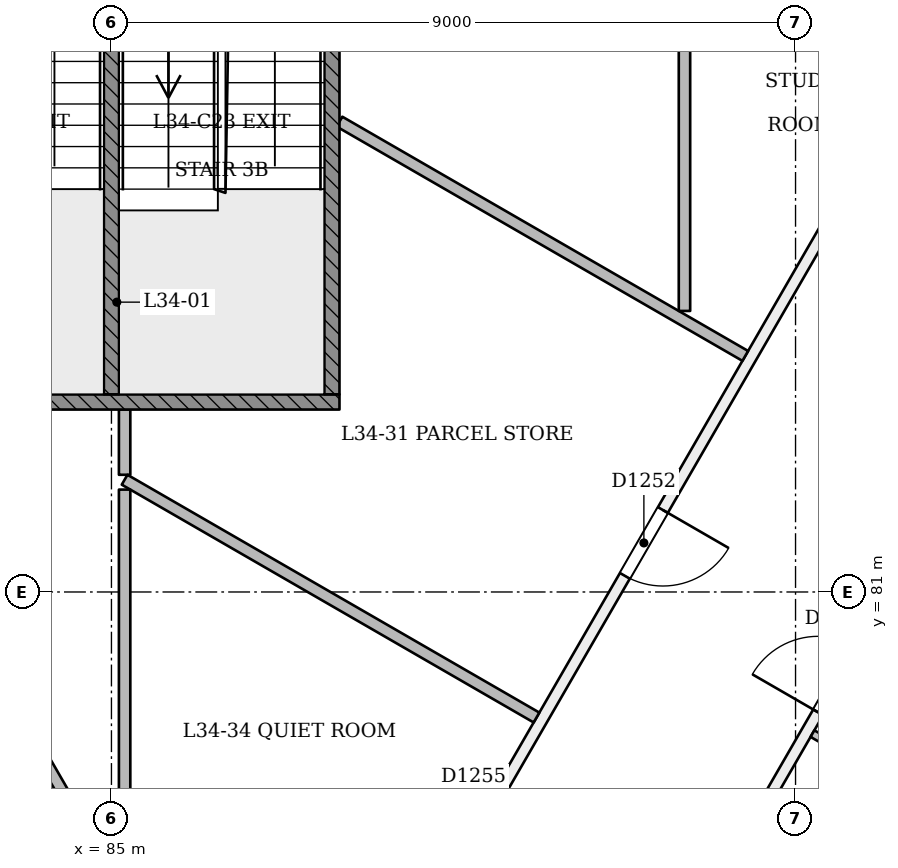
"""IFC4 building model, lengths in metres.
Left out: names, types, materials, properties, quantities, classifications, styles, units other than length and angle.
Written with IfcOpenShell. Run it as: python <this file> out.ifc"""

import sys

from ifc_helpers import new_model, si_unit, direction, frame, frame_2d, origin, place, context, subcontext, project, spatial, rectangle, extrude, element, fill, save


model = new_model("IFC4")
c1 = context("Model", 3, precision=1e-05, world=origin(), true_north=direction((0.0, 1.0)))
c2 = subcontext(c1, "Body", "Model", "MODEL_VIEW")
j1 = project(units=[si_unit("LENGTHUNIT", "METRE"), si_unit("PLANEANGLEUNIT", "RADIAN")], contexts=[c1])
p1 = place(None, origin())
s1 = spatial("IfcSite", under=j1, at=p1, CompositionType="ELEMENT")
p2 = place(p1, origin())
s2 = spatial("IfcBuilding", under=s1, at=p2, CompositionType="ELEMENT")
p3 = place(p2, frame((0.0, 0.0, 135.0)))
s3 = spatial("IfcBuildingStorey", under=s2, at=p3, CompositionType="ELEMENT", Elevation=135.0)
p4 = place(p3, frame((96.944, 90.2, 0.0), z_axis=(0.0, 0.0, 1.0), x_axis=(-0.500002955053, -0.866023697677, 0.0)))
e1 = element("IfcWall", 1, at=p4, inside=s3, PredefinedType="PARTITIONING", context=c2, shape_type="SweptSolid", body=[
    extrude(rectangle(XDim=23.758, YDim=0.15, at=frame_2d((11.879, 0.0))), origin(), (0.0, 0.0, 1.0), 3.15),
])
p5 = place(p4, frame((18.181, 0.0, 0.0)))
e2 = element("IfcOpeningElement", 2, at=p5, cuts=e1, PredefinedType="OPENING", context=c2, shape_type="SweptSolid", body=[
    extrude(rectangle(XDim=1.0, YDim=2.1, at=frame_2d((0.5, 1.05))), frame((0.0, 0.085, 0.0), z_axis=(0.0, -1.0, 0.0), x_axis=(1.0, 0.0, 0.0)), (0.0, 0.0, 1.0), 0.171),
])
p6 = place(p4, frame((9.378, 0.0, 0.0)))
e3 = element("IfcOpeningElement", 3, at=p6, cuts=e1, PredefinedType="OPENING", context=c2, shape_type="SweptSolid", body=[
    extrude(rectangle(XDim=1.0, YDim=2.1, at=frame_2d((0.5, 1.05))), frame((0.0, 0.085, 0.0), z_axis=(0.0, -1.0, 0.0), x_axis=(1.0, 0.0, 0.0)), (0.0, 0.0, 1.0), 0.171),
])
p7 = place(p4, frame((13.859, 0.0, 0.0)))
e4 = element("IfcOpeningElement", 4, at=p7, cuts=e1, PredefinedType="OPENING", context=c2, shape_type="SweptSolid", body=[
    extrude(rectangle(XDim=1.0, YDim=2.1, at=frame_2d((0.5, 1.05))), frame((0.0, 0.085, 0.0), z_axis=(0.0, -1.0, 0.0), x_axis=(1.0, 0.0, 0.0)), (0.0, 0.0, 1.0), 0.171),
])
p8 = place(p4, frame((2.845, 0.0, 0.0)))
e5 = element("IfcOpeningElement", 5, at=p8, cuts=e1, PredefinedType="OPENING", context=c2, shape_type="SweptSolid", body=[
    extrude(rectangle(XDim=1.0, YDim=2.1, at=frame_2d((0.5, 1.05))), frame((0.0, 0.085, 0.0), z_axis=(0.0, -1.0, 0.0), x_axis=(1.0, 0.0, 0.0)), (0.0, 0.0, 1.0), 0.171),
])
p9 = place(p3, frame((64.777, 98.34, 0.0), z_axis=(0.0, 0.0, 1.0), x_axis=(0.499997513821, -0.866026839176, 0.0)))
e6 = element("IfcWall", 6, at=p9, inside=s3, PredefinedType="PARTITIONING", context=c2, shape_type="SweptSolid", body=[
    extrude(rectangle(XDim=40.26, YDim=0.15, at=frame_2d((20.13, 0.0))), origin(), (0.0, 0.0, 1.0), 2.75),
])
p10 = place(p9, frame((0.2, 0.0, 0.0)))
e7 = element("IfcOpeningElement", 7, at=p10, cuts=e6, PredefinedType="OPENING", context=c2, shape_type="SweptSolid", body=[
    extrude(rectangle(XDim=1.2, YDim=2.1, at=frame_2d((0.6, 1.05))), frame((0.0, 0.085, 0.0), z_axis=(0.0, -1.0, 0.0), x_axis=(1.0, 0.0, 0.0)), (0.0, 0.0, 1.0), 0.171),
])
p11 = place(p9, frame((9.525, 0.0, 0.0)))
e8 = element("IfcOpeningElement", 8, at=p11, cuts=e6, PredefinedType="OPENING", context=c2, shape_type="SweptSolid", body=[
    extrude(rectangle(XDim=1.0, YDim=2.1, at=frame_2d((0.5, 1.05))), frame((0.0, 0.085, 0.0), z_axis=(0.0, -1.0, 0.0), x_axis=(1.0, 0.0, 0.0)), (0.0, 0.0, 1.0), 0.171),
])
p12 = place(p9, frame((11.735, 0.0, 0.0)))
e9 = element("IfcOpeningElement", 9, at=p12, cuts=e6, PredefinedType="OPENING", context=c2, shape_type="SweptSolid", body=[
    extrude(rectangle(XDim=1.0, YDim=2.1, at=frame_2d((0.5, 1.05))), frame((0.0, 0.085, 0.0), z_axis=(0.0, -1.0, 0.0), x_axis=(1.0, 0.0, 0.0)), (0.0, 0.0, 1.0), 0.171),
])
p13 = place(p9, frame((19.53, 0.0, 0.0)))
e10 = element("IfcOpeningElement", 10, at=p13, cuts=e6, PredefinedType="OPENING", context=c2, shape_type="SweptSolid", body=[
    extrude(rectangle(XDim=1.2, YDim=2.1, at=frame_2d((0.6, 1.05))), frame((0.0, 0.085, 0.0), z_axis=(0.0, -1.0, 0.0), x_axis=(1.0, 0.0, 0.0)), (0.0, 0.0, 1.0), 0.171),
])
p14 = place(p9, frame((27.41, 0.0, 0.0)))
e11 = element("IfcOpeningElement", 11, at=p14, cuts=e6, PredefinedType="OPENING", context=c2, shape_type="SweptSolid", body=[
    extrude(rectangle(XDim=1.0, YDim=2.1, at=frame_2d((0.5, 1.05))), frame((0.0, 0.085, 0.0), z_axis=(0.0, -1.0, 0.0), x_axis=(1.0, 0.0, 0.0)), (0.0, 0.0, 1.0), 0.171),
])
p15 = place(p9, frame((34.13, 0.0, 0.0)))
e12 = element("IfcOpeningElement", 12, at=p15, cuts=e6, PredefinedType="OPENING", context=c2, shape_type="SweptSolid", body=[
    extrude(rectangle(XDim=1.2, YDim=2.1, at=frame_2d((0.6, 1.05))), frame((0.0, 0.085, 0.0), z_axis=(0.0, -1.0, 0.0), x_axis=(1.0, 0.0, 0.0)), (0.0, 0.0, 1.0), 0.171),
])
p16 = place(p9, frame((38.78, 0.0, 0.0)))
e13 = element("IfcOpeningElement", 13, at=p16, cuts=e6, PredefinedType="OPENING", context=c2, shape_type="SweptSolid", body=[
    extrude(rectangle(XDim=1.0, YDim=2.1, at=frame_2d((0.5, 1.05))), frame((0.0, 0.085, 0.0), z_axis=(0.0, -1.0, 0.0), x_axis=(1.0, 0.0, 0.0)), (0.0, 0.0, 1.0), 0.171),
])
p17 = place(p3, frame((85.093, 63.473, 0.0), z_axis=(0.0, 0.0, 1.0), x_axis=(0.499997513821, 0.866026839176, 0.0)))
e14 = element("IfcWall", 14, at=p17, inside=s3, PredefinedType="PARTITIONING", context=c2, shape_type="SweptSolid", body=[
    extrude(rectangle(XDim=40.26, YDim=0.15, at=frame_2d((20.13, 0.0))), origin(), (0.0, 0.0, 1.0), 2.75),
])
p18 = place(p17, frame((0.429, 0.0, 0.0)))
e15 = element("IfcOpeningElement", 15, at=p18, cuts=e14, PredefinedType="OPENING", context=c2, shape_type="SweptSolid", body=[
    extrude(rectangle(XDim=1.2, YDim=2.1, at=frame_2d((0.6, 1.05))), frame((0.0, 0.085, 0.0), z_axis=(0.0, -1.0, 0.0), x_axis=(1.0, 0.0, 0.0)), (0.0, 0.0, 1.0), 0.171),
])
p19 = place(p17, frame((2.85, 0.0, 0.0)))
e16 = element("IfcOpeningElement", 16, at=p19, cuts=e14, PredefinedType="OPENING", context=c2, shape_type="SweptSolid", body=[
    extrude(rectangle(XDim=1.0, YDim=2.1, at=frame_2d((0.5, 1.05))), frame((0.0, 0.085, 0.0), z_axis=(0.0, -1.0, 0.0), x_axis=(1.0, 0.0, 0.0)), (0.0, 0.0, 1.0), 0.171),
])
p20 = place(p17, frame((8.28, 0.0, 0.0)))
e17 = element("IfcOpeningElement", 17, at=p20, cuts=e14, PredefinedType="OPENING", context=c2, shape_type="SweptSolid", body=[
    extrude(rectangle(XDim=1.2, YDim=2.1, at=frame_2d((0.6, 1.05))), frame((0.0, 0.085, 0.0), z_axis=(0.0, -1.0, 0.0), x_axis=(1.0, 0.0, 0.0)), (0.0, 0.0, 1.0), 0.171),
])
p21 = place(p17, frame((11.735, 0.0, 0.0)))
e18 = element("IfcOpeningElement", 18, at=p21, cuts=e14, PredefinedType="OPENING", context=c2, shape_type="SweptSolid", body=[
    extrude(rectangle(XDim=1.0, YDim=2.1, at=frame_2d((0.5, 1.05))), frame((0.0, 0.085, 0.0), z_axis=(0.0, -1.0, 0.0), x_axis=(1.0, 0.0, 0.0)), (0.0, 0.0, 1.0), 0.171),
])
p22 = place(p17, frame((18.41, 0.0, 0.0)))
e19 = element("IfcOpeningElement", 19, at=p22, cuts=e14, PredefinedType="OPENING", context=c2, shape_type="SweptSolid", body=[
    extrude(rectangle(XDim=1.0, YDim=2.1, at=frame_2d((0.5, 1.05))), frame((0.0, 0.085, 0.0), z_axis=(0.0, -1.0, 0.0), x_axis=(1.0, 0.0, 0.0)), (0.0, 0.0, 1.0), 0.171),
])
p23 = place(p17, frame((20.85, 0.0, 0.0)))
e20 = element("IfcOpeningElement", 20, at=p23, cuts=e14, PredefinedType="OPENING", context=c2, shape_type="SweptSolid", body=[
    extrude(rectangle(XDim=1.0, YDim=2.1, at=frame_2d((0.5, 1.05))), frame((0.0, 0.085, 0.0), z_axis=(0.0, -1.0, 0.0), x_axis=(1.0, 0.0, 0.0)), (0.0, 0.0, 1.0), 0.171),
])
p24 = place(p17, frame((26.38, 0.0, 0.0)))
e21 = element("IfcOpeningElement", 21, at=p24, cuts=e14, PredefinedType="OPENING", context=c2, shape_type="SweptSolid", body=[
    extrude(rectangle(XDim=1.0, YDim=2.1, at=frame_2d((0.5, 1.05))), frame((0.0, 0.085, 0.0), z_axis=(0.0, -1.0, 0.0), x_axis=(1.0, 0.0, 0.0)), (0.0, 0.0, 1.0), 0.171),
])
p25 = place(p17, frame((34.13, 0.0, 0.0)))
e22 = element("IfcOpeningElement", 22, at=p25, cuts=e14, PredefinedType="OPENING", context=c2, shape_type="SweptSolid", body=[
    extrude(rectangle(XDim=1.2, YDim=2.1, at=frame_2d((0.6, 1.05))), frame((0.0, 0.085, 0.0), z_axis=(0.0, -1.0, 0.0), x_axis=(1.0, 0.0, 0.0)), (0.0, 0.0, 1.0), 0.171),
])
p26 = place(p17, frame((38.86, 0.0, 0.0)))
e23 = element("IfcOpeningElement", 23, at=p26, cuts=e14, PredefinedType="OPENING", context=c2, shape_type="SweptSolid", body=[
    extrude(rectangle(XDim=1.2, YDim=2.1, at=frame_2d((0.6, 1.05))), frame((0.0, 0.085, 0.0), z_axis=(0.0, -1.0, 0.0), x_axis=(1.0, 0.0, 0.0)), (0.0, 0.0, 1.0), 0.171),
])
p27 = place(p3, frame((85.0, 69.513, 0.0), z_axis=(0.0, 0.0, 1.0), x_axis=(-0.500001724231, 0.866024408297, 0.0)))
e24 = element("IfcWall", 24, at=p27, inside=s3, PredefinedType="PARTITIONING", context=c2, shape_type="SweptSolid", body=[
    extrude(rectangle(XDim=23.888, YDim=0.15, at=frame_2d((11.944, 0.0))), origin(), (0.0, 0.0, 1.0), 3.15),
])
p28 = place(p27, frame((21.016, 0.0, 0.0)))
e25 = element("IfcOpeningElement", 25, at=p28, cuts=e24, PredefinedType="OPENING", context=c2, shape_type="SweptSolid", body=[
    extrude(rectangle(XDim=0.9, YDim=2.1, at=frame_2d((0.45, 1.05))), frame((0.0, 0.085, 0.0), z_axis=(0.0, -1.0, 0.0), x_axis=(1.0, 0.0, 0.0)), (0.0, 0.0, 1.0), 0.171),
])
p29 = place(p27, frame((13.865, 0.0, 0.0)))
e26 = element("IfcOpeningElement", 26, at=p29, cuts=e24, PredefinedType="OPENING", context=c2, shape_type="SweptSolid", body=[
    extrude(rectangle(XDim=0.9, YDim=2.1, at=frame_2d((0.45, 1.05))), frame((0.0, 0.085, 0.0), z_axis=(0.0, -1.0, 0.0), x_axis=(1.0, 0.0, 0.0)), (0.0, 0.0, 1.0), 0.171),
])
p30 = place(p27, frame((10.767, 0.0, 0.0)))
e27 = element("IfcOpeningElement", 27, at=p30, cuts=e24, PredefinedType="OPENING", context=c2, shape_type="SweptSolid", body=[
    extrude(rectangle(XDim=1.0, YDim=2.1, at=frame_2d((0.5, 1.05))), frame((0.0, 0.085, 0.0), z_axis=(0.0, -1.0, 0.0), x_axis=(1.0, 0.0, 0.0)), (0.0, 0.0, 1.0), 0.171),
])
p31 = place(p27, frame((5.609, 0.0, 0.0)))
e28 = element("IfcOpeningElement", 28, at=p31, cuts=e24, PredefinedType="OPENING", context=c2, shape_type="SweptSolid", body=[
    extrude(rectangle(XDim=1.0, YDim=2.1, at=frame_2d((0.5, 1.05))), frame((0.0, 0.085, 0.0), z_axis=(0.0, -1.0, 0.0), x_axis=(1.0, 0.0, 0.0)), (0.0, 0.0, 1.0), 0.171),
])
p32 = place(p27, frame((17.351, 0.0, 0.0)))
e29 = element("IfcOpeningElement", 29, at=p32, cuts=e24, PredefinedType="OPENING", context=c2, shape_type="SweptSolid", body=[
    extrude(rectangle(XDim=1.0, YDim=2.1, at=frame_2d((0.5, 1.05))), frame((0.0, 0.085, 0.0), z_axis=(0.0, -1.0, 0.0), x_axis=(1.0, 0.0, 0.0)), (0.0, 0.0, 1.0), 0.171),
])
p33 = place(p3, frame((94.223, 79.137, 0.0), z_axis=(0.0, 0.0, 1.0), x_axis=(0.866048868473, -0.499959355765, 0.0)))
e30 = element("IfcWall", 30, at=p33, inside=s3, PredefinedType="PARTITIONING", context=c2, shape_type="SweptSolid", body=[
    extrude(rectangle(XDim=2.825, YDim=0.1, at=frame_2d((1.413, 0.0))), origin(), (0.0, 0.0, 1.0), 3.15),
])
p34 = place(p33, frame((0.925, 0.0, 0.0)))
e31 = element("IfcOpeningElement", 31, at=p34, cuts=e30, PredefinedType="OPENING", context=c2, shape_type="SweptSolid", body=[
    extrude(rectangle(XDim=0.9, YDim=2.1, at=frame_2d((0.45, 1.05))), frame((0.0, 0.061, 0.0), z_axis=(0.0, -1.0, 0.0), x_axis=(1.0, 0.0, 0.0)), (0.0, 0.0, 1.0), 0.121),
])
p35 = place(p3, frame((85.173, 83.4, 0.0), z_axis=(0.0, 0.0, 1.0), x_axis=(0.0, -1.0, 0.0)))
e32 = element("IfcWall", 32, at=p35, inside=s3, PredefinedType="PARTITIONING", context=c2, shape_type="SweptSolid", body=[
    extrude(rectangle(XDim=0.858, YDim=0.15, at=frame_2d((0.429, 0.0))), origin(), (0.0, 0.0, 1.0), 3.15),
])
p36 = place(p3, frame((85.173, 82.477, 0.0), z_axis=(0.0, 0.0, 1.0), x_axis=(0.866040044389, -0.499974640872, 0.0)))
e33 = element("IfcWall", 33, at=p36, inside=s3, PredefinedType="PARTITIONING", context=c2, shape_type="SweptSolid", body=[
    extrude(rectangle(XDim=6.257, YDim=0.15, at=frame_2d((3.128, 0.0))), origin(), (0.0, 0.0, 1.0), 3.15),
])
p37 = place(p3, frame((93.339, 84.106, 0.0), z_axis=(0.0, 0.0, 1.0), x_axis=(-0.866024003323, 0.500002425662, 0.0)))
e34 = element("IfcWall", 34, at=p37, inside=s3, PredefinedType="PARTITIONING", context=c2, shape_type="SweptSolid", body=[
    extrude(rectangle(XDim=6.165, YDim=0.15, at=frame_2d((3.082, 0.0))), origin(), (0.0, 0.0, 1.0), 3.15),
])
p38 = place(p3, frame((83.52, 79.822, 0.0), z_axis=(0.0, 0.0, 1.0), x_axis=(0.500018127915, -0.866014937375, 0.0)))
e35 = element("IfcWall", 35, at=p38, inside=s3, PredefinedType="PARTITIONING", context=c2, shape_type="SweptSolid", body=[
    extrude(rectangle(XDim=3.026, YDim=0.15, at=frame_2d((1.513, 0.0))), origin(), (0.0, 0.0, 1.0), 3.15),
])
p39 = place(p3, frame((85.173, 77.028, 0.0), z_axis=(0.0, 0.0, 1.0), x_axis=(0.0, 1.0, 0.0)))
e36 = element("IfcWall", 36, at=p39, inside=s3, PredefinedType="PARTITIONING", context=c2, shape_type="SweptSolid", body=[
    extrude(rectangle(XDim=5.319, YDim=0.15, at=frame_2d((2.659, 0.0))), origin(), (0.0, 0.0, 1.0), 3.15),
])
p40 = place(p3, frame((92.539, 84.697, 0.0), z_axis=(0.0, 0.0, 1.0), x_axis=(0.0, 1.0, 0.0)))
e37 = element("IfcWall", 37, at=p40, inside=s3, PredefinedType="PARTITIONING", context=c2, shape_type="SweptSolid", body=[
    extrude(rectangle(XDim=5.902, YDim=0.15, at=frame_2d((2.951, 0.0))), origin(), (0.0, 0.0, 1.0), 3.15),
])
p41 = place(p3, frame((82.0, 83.5, 0.0), z_axis=(0.0, 0.0, 1.0), x_axis=(1.0, 0.0, 0.0)))
e38 = element("IfcWall", 38, at=p41, inside=s3, PredefinedType="SOLIDWALL", context=c2, shape_type="SweptSolid", body=[
    extrude(rectangle(XDim=6.0, YDim=0.2, at=frame_2d((3.0, 0.0))), origin(), (0.0, 0.0, 1.0), 3.15),
])
for number, where, z_axis, x_axis in (
    (39, (87.9, 83.6, 0.0), (0.0, 0.0, 1.0), (0.0, 1.0, 0.0)),
    (40, (85.0, 83.6, 0.0), (0.0, 0.0, 1.0), (0.0, 1.0, 0.0)),
):
    element("IfcWall", number, at=place(p3, frame(where, z_axis=z_axis, x_axis=x_axis)), inside=s3, PredefinedType="SOLIDWALL", context=c2, shape_type="SweptSolid", body=[
        extrude(rectangle(XDim=6.8, YDim=0.2, at=frame_2d((3.4, 0.0))), origin(), (0.0, 0.0, 1.0), 3.15),
    ])
p42 = place(p22, origin())
e41 = element("IfcDoor", 41, at=p42, inside=s3, OperationType="SINGLE_SWING_LEFT", PredefinedType="NOTDEFINED", context=c2, shape_type="SweptSolid", body=[
    extrude(rectangle(XDim=1.0, YDim=2.1, at=frame_2d((0.5, 1.05))), frame((0.0, 0.025, 0.0), z_axis=(0.0, -1.0, 0.0), x_axis=(1.0, 0.0, 0.0)), (0.0, 0.0, 1.0), 0.05),
])
fill(e19, e41)
p43 = place(p6, origin())
e42 = element("IfcDoor", 42, at=p43, inside=s3, OperationType="SINGLE_SWING_LEFT", PredefinedType="NOTDEFINED", context=c2, shape_type="SweptSolid", body=[
    extrude(rectangle(XDim=1.0, YDim=2.1, at=frame_2d((0.5, 1.05))), frame((0.0, 0.025, 0.0), z_axis=(0.0, -1.0, 0.0), x_axis=(1.0, 0.0, 0.0)), (0.0, 0.0, 1.0), 0.05),
])
fill(e3, e42)
save(model, sys.argv[1])
